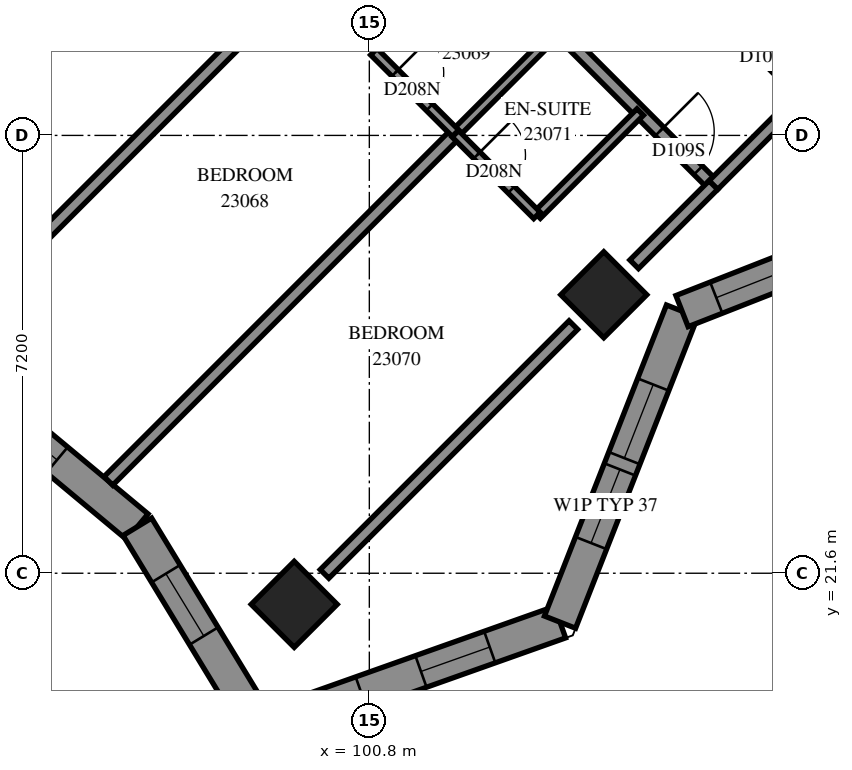
"""IFC4 building model, lengths in metres.
Left out: names, types, materials, properties, quantities, classifications, styles, units other than length and angle.
Written with IfcOpenShell. Run it as: python <this file> out.ifc"""

import sys

from ifc_helpers import new_model, si_unit, direction, frame, frame_2d, origin, origin_2d, place, context, subcontext, project, spatial, polyline, rectangle, outline, extrude, element, fill, save


model = new_model("IFC4")
c1 = context("Model", 3, precision=1e-05, world=origin(), true_north=direction((0.0, 1.0)))
c2 = subcontext(c1, "Body", "Model", "MODEL_VIEW")
j1 = project(units=[si_unit("LENGTHUNIT", "METRE"), si_unit("PLANEANGLEUNIT", "RADIAN")], contexts=[c1])
p1 = place(None, origin())
s1 = spatial("IfcSite", under=j1, at=p1, CompositionType="ELEMENT")
p2 = place(p1, origin())
s2 = spatial("IfcBuilding", under=s1, at=p2, CompositionType="ELEMENT")
p3 = place(p2, frame((0.0, 0.0, 88.0)))
s3 = spatial("IfcBuildingStorey", under=s2, at=p3, CompositionType="ELEMENT", Elevation=88.0)
for number, where, z_axis, x_axis in (
    (1, (104.656, 26.18, 0.0), (0.0, 0.0, 1.0), (0.707, -0.707, 0.0)),
    (2, (99.565, 21.088, 0.0), (0.0, 0.0, 1.0), (0.707, -0.707, 0.0)),
):
    element("IfcColumn", number, at=place(p3, frame(where, z_axis=z_axis, x_axis=x_axis)), inside=s3, PredefinedType="COLUMN", context=c2, shape_type="SweptSolid", body=[
        extrude(rectangle(XDim=1.0, YDim=1.0, at=origin_2d()), origin(), (0.0, 0.0, 1.0), 3.1),
    ])
p4 = place(p3, frame((99.004, 19.046, 0.0), z_axis=(0.0, 0.0, 1.0), x_axis=(0.9424217233, 0.3344268162, 0.0)))
e3 = element("IfcWall", 3, at=p4, inside=s3, PredefinedType="SOLIDWALL", context=c2, shape_type="SweptSolid", body=[
    extrude(outline(polyline([(-0.224, -0.275), (5.359, -0.275), (5.108, 0.275), (0.224, 0.275), (-0.224, -0.275)])), origin(), (0.0, 0.0, 1.0), 3.1),
])
p5 = place(p4, frame((0.565, 0.0, 0.5)))
e4 = element("IfcOpeningElement", 4, at=p5, cuts=e3, PredefinedType="OPENING", context=c2, shape_type="SweptSolid", body=[
    extrude(rectangle(XDim=1.2, YDim=2.45, at=frame_2d((0.6, 1.225))), frame((0.0, 0.285, 0.0), z_axis=(0.0, -1.0, 0.0), x_axis=(1.0, 0.0, 0.0)), (0.0, 0.0, 1.0), 0.57),
])
p6 = place(p4, frame((2.807, 0.0, 0.5)))
e5 = element("IfcOpeningElement", 5, at=p6, cuts=e3, PredefinedType="OPENING", context=c2, shape_type="SweptSolid", body=[
    extrude(rectangle(XDim=1.2, YDim=2.45, at=frame_2d((0.6, 1.225))), frame((0.0, 0.285, 0.0), z_axis=(0.0, -1.0, 0.0), x_axis=(1.0, 0.0, 0.0)), (0.0, 0.0, 1.0), 0.57),
])
p7 = place(p3, frame((103.936, 20.796, 0.0), z_axis=(0.0, 0.0, 1.0), x_axis=(0.3651939331, 0.9309314643, 0.0)))
e6 = element("IfcWall", 6, at=p7, inside=s3, PredefinedType="SOLIDWALL", context=c2, shape_type="SweptSolid", body=[
    extrude(outline(polyline([(-0.125, -0.275), (5.374, -0.275), (5.614, 0.275), (0.125, 0.275), (-0.125, -0.275)])), origin(), (0.0, 0.0, 1.0), 3.1),
])
p8 = place(p7, frame((1.397, 0.0, 0.5)))
e7 = element("IfcOpeningElement", 7, at=p8, cuts=e6, PredefinedType="OPENING", context=c2, shape_type="SweptSolid", body=[
    extrude(rectangle(XDim=1.3, YDim=2.45, at=frame_2d((0.65, 1.225))), frame((0.0, 0.285, 0.0), z_axis=(0.0, -1.0, 0.0), x_axis=(1.0, 0.0, 0.0)), (0.0, 0.0, 1.0), 0.57),
])
p9 = place(p7, frame((2.897, 0.0, 0.5)))
e8 = element("IfcOpeningElement", 8, at=p9, cuts=e6, PredefinedType="OPENING", context=c2, shape_type="SweptSolid", body=[
    extrude(rectangle(XDim=1.3, YDim=2.45, at=frame_2d((0.65, 1.225))), frame((0.0, 0.285, 0.0), z_axis=(0.0, -1.0, 0.0), x_axis=(1.0, 0.0, 0.0)), (0.0, 0.0, 1.0), 0.57),
])
p10 = place(p3, frame((105.942, 25.91, 0.0), z_axis=(0.0, 0.0, 1.0), x_axis=(0.9309314643, 0.3651939331, 0.0)))
e9 = element("IfcWall", 9, at=p10, inside=s3, PredefinedType="SOLIDWALL", context=c2, shape_type="SweptSolid", body=[
    extrude(outline(polyline([(0.12, -0.275), (5.62, -0.275), (5.369, 0.275), (-0.12, 0.275), (0.12, -0.275)])), origin(), (0.0, 0.0, 1.0), 3.1),
])
p11 = place(p10, frame((0.605, 0.0, 0.5)))
e10 = element("IfcOpeningElement", 10, at=p11, cuts=e9, PredefinedType="OPENING", context=c2, shape_type="SweptSolid", body=[
    extrude(rectangle(XDim=1.2, YDim=2.45, at=frame_2d((0.6, 1.225))), frame((0.0, 0.285, 0.0), z_axis=(0.0, -1.0, 0.0), x_axis=(1.0, 0.0, 0.0)), (0.0, 0.0, 1.0), 0.57),
])
p12 = place(p10, frame((3.089, 0.0, 0.5)))
e11 = element("IfcOpeningElement", 11, at=p12, cuts=e9, PredefinedType="OPENING", context=c2, shape_type="SweptSolid", body=[
    extrude(rectangle(XDim=1.2, YDim=2.45, at=frame_2d((0.6, 1.225))), frame((0.0, 0.285, 0.0), z_axis=(0.0, -1.0, 0.0), x_axis=(1.0, 0.0, 0.0)), (0.0, 0.0, 1.0), 0.57),
])
p13 = place(p3, frame((93.923, 24.913, 0.0), z_axis=(0.0, 0.0, 1.0), x_axis=(0.7685750371, -0.639759652, 0.0)))
e12 = element("IfcWall", 12, at=p13, inside=s3, PredefinedType="SOLIDWALL", context=c2, shape_type="SweptSolid", body=[
    extrude(outline(polyline([(-0.025, -0.275), (3.938, -0.275), (4.03, 0.275), (0.025, 0.275), (-0.025, -0.275)])), origin(), (0.0, 0.0, 1.0), 3.1),
])
p14 = place(p13, frame((1.066, 0.0, 0.5)))
e13 = element("IfcOpeningElement", 13, at=p14, cuts=e12, PredefinedType="OPENING", context=c2, shape_type="SweptSolid", body=[
    extrude(rectangle(XDim=1.2, YDim=2.45, at=frame_2d((0.6, 1.225))), frame((0.0, 0.285, 0.0), z_axis=(0.0, -1.0, 0.0), x_axis=(1.0, 0.0, 0.0)), (0.0, 0.0, 1.0), 0.57),
])
p15 = place(p3, frame((96.985, 22.364, 0.0), z_axis=(0.0, 0.0, 1.0), x_axis=(0.5197558303, -0.8543148581, 0.0)))
e14 = element("IfcWall", 14, at=p15, inside=s3, PredefinedType="SOLIDWALL", context=c2, shape_type="SweptSolid", body=[
    extrude(outline(polyline([(0.046, -0.275), (4.108, -0.275), (3.661, 0.275), (-0.046, 0.275), (0.046, -0.275)])), origin(), (0.0, 0.0, 1.0), 3.1),
])
p16 = place(p15, frame((0.903, 0.0, 0.5)))
e15 = element("IfcOpeningElement", 15, at=p16, cuts=e14, PredefinedType="OPENING", context=c2, shape_type="SweptSolid", body=[
    extrude(rectangle(XDim=1.2, YDim=2.45, at=frame_2d((0.6, 1.225))), frame((0.0, 0.285, 0.0), z_axis=(0.0, -1.0, 0.0), x_axis=(1.0, 0.0, 0.0)), (0.0, 0.0, 1.0), 0.57),
])
p17 = place(p3, frame((96.509, 23.118, 0.0), z_axis=(0.0, 0.0, 1.0), x_axis=(0.7069829425, 0.7072305982, 0.0)))
e16 = element("IfcWall", 16, at=p17, inside=s3, PredefinedType="PARTITIONING", context=c2, shape_type="SweptSolid", body=[
    extrude(rectangle(XDim=8.076, YDim=0.2, at=frame_2d((4.038, 0.0))), origin(), (0.0, 0.0, 1.0), 3.1),
])
p18 = place(p3, frame((101.365, 33.071, 0.0), z_axis=(0.0, 0.0, 1.0), x_axis=(0.7071067812, -0.7071067812, 0.0)))
e17 = element("IfcWall", 17, at=p18, inside=s3, PredefinedType="PARTITIONING", context=c2, shape_type="SweptSolid", body=[
    extrude(rectangle(XDim=7.2, YDim=0.2, at=frame_2d((3.6, 0.0))), origin(), (0.0, 0.0, 1.0), 3.1),
])
p19 = place(p18, frame((0.248, 0.0, 0.0)))
e18 = element("IfcOpeningElement", 18, at=p19, cuts=e17, PredefinedType="OPENING", context=c2, shape_type="SweptSolid", body=[
    extrude(rectangle(XDim=0.9, YDim=2.1, at=frame_2d((0.45, 1.05))), frame((0.0, 0.11, 0.0), z_axis=(0.0, -1.0, 0.0), x_axis=(1.0, 0.0, 0.0)), (0.0, 0.0, 1.0), 0.22),
])
p20 = place(p18, frame((5.95, 0.0, 0.0)))
e19 = element("IfcOpeningElement", 19, at=p20, cuts=e17, PredefinedType="OPENING", context=c2, shape_type="SweptSolid", body=[
    extrude(rectangle(XDim=0.9, YDim=2.1, at=frame_2d((0.45, 1.05))), frame((0.0, 0.11, 0.0), z_axis=(0.0, -1.0, 0.0), x_axis=(1.0, 0.0, 0.0)), (0.0, 0.0, 1.0), 0.22),
])
p21 = place(p3, frame((100.063, 21.589, 0.0), z_axis=(0.0, 0.0, 1.0), x_axis=(0.7071067812, 0.7071067812, 0.0)))
e20 = element("IfcWall", 20, at=p21, inside=s3, PredefinedType="PARTITIONING", context=c2, shape_type="SweptSolid", body=[
    extrude(rectangle(XDim=5.787, YDim=0.2, at=frame_2d((2.893, 0.0))), origin(), (0.0, 0.0, 1.0), 2.6),
])
p22 = place(p3, frame((94.973, 26.681, 0.0), z_axis=(0.0, 0.0, 1.0), x_axis=(0.7071067812, 0.7071067812, 0.0)))
e21 = element("IfcWall", 21, at=p22, inside=s3, PredefinedType="PARTITIONING", context=c2, shape_type="SweptSolid", body=[
    extrude(rectangle(XDim=5.784, YDim=0.2, at=frame_2d((2.892, 0.0))), origin(), (0.0, 0.0, 1.0), 3.1),
])
p23 = place(p3, frame((104.123, 33.282, 0.0), z_axis=(0.0, 0.0, 1.0), x_axis=(0.7071067812, -0.7071067812, 0.0)))
e22 = element("IfcWall", 22, at=p23, inside=s3, PredefinedType="PARTITIONING", context=c2, shape_type="SweptSolid", body=[
    extrude(rectangle(XDim=5.399, YDim=0.2, at=frame_2d((2.7, 0.0))), origin(), (0.0, 0.0, 1.0), 3.1),
])
p24 = place(p23, frame((4.08, 0.0, 0.0)))
e23 = element("IfcOpeningElement", 23, at=p24, cuts=e22, PredefinedType="OPENING", context=c2, shape_type="SweptSolid", body=[
    extrude(rectangle(XDim=0.9, YDim=2.1, at=frame_2d((0.45, 1.05))), frame((0.0, 0.11, 0.0), z_axis=(0.0, -1.0, 0.0), x_axis=(1.0, 0.0, 0.0)), (0.0, 0.0, 1.0), 0.22),
])
p25 = place(p3, frame((100.871, 30.175, 0.0), z_axis=(0.0, 0.0, 1.0), x_axis=(0.7071067812, 0.7071067812, 0.0)))
e24 = element("IfcWall", 24, at=p25, inside=s3, PredefinedType="PARTITIONING", context=c2, shape_type="SweptSolid", body=[
    extrude(rectangle(XDim=2.401, YDim=0.15, at=frame_2d((1.201, 0.0))), origin(), (0.0, 0.0, 1.0), 3.1),
])
for number, where, z_axis, x_axis in (
    (25, (102.216, 28.832, 0.0), (0.0, 0.0, 1.0), (0.707, 0.707, 0.0)),
    (26, (103.559, 27.489, 0.0), (0.0, 0.0, 1.0), (0.707, 0.707, 0.0)),
):
    element("IfcWall", number, at=place(p3, frame(where, z_axis=z_axis, x_axis=x_axis)), inside=s3, PredefinedType="PARTITIONING", context=c2, shape_type="SweptSolid", body=[
        extrude(rectangle(XDim=2.398, YDim=0.15, at=frame_2d((1.199, 0.0))), origin(), (0.0, 0.0, 1.0), 3.1),
    ])
p26 = place(p3, frame((106.457, 27.983, 0.0), z_axis=(0.0, 0.0, 1.0), x_axis=(0.7071067812, 0.7071067812, 0.0)))
e27 = element("IfcWall", 27, at=p26, inside=s3, PredefinedType="PARTITIONING", context=c2, shape_type="SweptSolid", body=[
    extrude(rectangle(XDim=2.102, YDim=0.2, at=frame_2d((1.051, 0.0))), origin(), (0.0, 0.0, 1.0), 2.6),
])
p27 = place(p3, frame((100.875, 30.177, 0.0), z_axis=(0.0, 0.0, 1.0), x_axis=(0.7076330979, -0.7065800724, 0.0)))
e28 = element("IfcWall", 28, at=p27, inside=s3, PredefinedType="PARTITIONING", context=c2, shape_type="SweptSolid", body=[
    extrude(rectangle(XDim=1.899, YDim=0.15, at=frame_2d((0.95, 0.0))), origin(), (0.0, 0.0, 1.0), 3.1),
])
p28 = place(p27, frame((0.493, 0.0, 0.0)))
e29 = element("IfcOpeningElement", 29, at=p28, cuts=e28, PredefinedType="OPENING", context=c2, shape_type="SweptSolid", body=[
    extrude(rectangle(XDim=0.8, YDim=2.1, at=frame_2d((0.4, 1.05))), frame((0.0, 0.085, 0.0), z_axis=(0.0, -1.0, 0.0), x_axis=(1.0, 0.0, 0.0)), (0.0, 0.0, 1.0), 0.17),
])
p29 = place(p3, frame((102.215, 28.826, 0.0), z_axis=(0.0, 0.0, 1.0), x_axis=(0.7071067812, -0.7071067812, 0.0)))
e30 = element("IfcWall", 30, at=p29, inside=s3, PredefinedType="PARTITIONING", context=c2, shape_type="SweptSolid", body=[
    extrude(rectangle(XDim=1.898, YDim=0.15, at=frame_2d((0.949, 0.0))), origin(), (0.0, 0.0, 1.0), 3.1),
])
p30 = place(p29, frame((0.5, 0.0, 0.0)))
e31 = element("IfcOpeningElement", 31, at=p30, cuts=e30, PredefinedType="OPENING", context=c2, shape_type="SweptSolid", body=[
    extrude(rectangle(XDim=0.8, YDim=2.1, at=frame_2d((0.4, 1.05))), frame((0.0, 0.085, 0.0), z_axis=(0.0, -1.0, 0.0), x_axis=(1.0, 0.0, 0.0)), (0.0, 0.0, 1.0), 0.17),
])
p31 = place(p3, frame((105.155, 26.681, 0.0), z_axis=(0.0, 0.0, 1.0), x_axis=(0.7071067812, 0.7071067812, 0.0)))
e32 = element("IfcWall", 32, at=p31, inside=s3, PredefinedType="PARTITIONING", context=c2, shape_type="SweptSolid", body=[
    extrude(rectangle(XDim=1.841, YDim=0.2, at=frame_2d((0.921, 0.0))), origin(), (0.0, 0.0, 1.0), 2.6),
])
p32 = place(p5, origin())
e33 = element("IfcWindow", 33, at=p32, inside=s3, PartitioningType="SINGLE_PANEL", PredefinedType="WINDOW", context=c2, shape_type="SweptSolid", body=[
    extrude(rectangle(XDim=1.2, YDim=2.45, at=frame_2d((0.6, 1.225))), frame((0.0, 0.155, 0.0), z_axis=(0.0, -1.0, 0.0), x_axis=(1.0, 0.0, 0.0)), (0.0, 0.0, 1.0), 0.06),
])
fill(e4, e33)
p33 = place(p6, origin())
e34 = element("IfcWindow", 34, at=p33, inside=s3, PartitioningType="SINGLE_PANEL", PredefinedType="WINDOW", context=c2, shape_type="SweptSolid", body=[
    extrude(rectangle(XDim=1.2, YDim=2.45, at=frame_2d((0.6, 1.225))), frame((0.0, 0.155, 0.0), z_axis=(0.0, -1.0, 0.0), x_axis=(1.0, 0.0, 0.0)), (0.0, 0.0, 1.0), 0.06),
])
fill(e5, e34)
p34 = place(p8, origin())
e35 = element("IfcWindow", 35, at=p34, inside=s3, PartitioningType="SINGLE_PANEL", PredefinedType="WINDOW", context=c2, shape_type="SweptSolid", body=[
    extrude(rectangle(XDim=1.3, YDim=2.45, at=frame_2d((0.65, 1.225))), frame((0.0, 0.155, 0.0), z_axis=(0.0, -1.0, 0.0), x_axis=(1.0, 0.0, 0.0)), (0.0, 0.0, 1.0), 0.06),
])
fill(e7, e35)
p35 = place(p9, origin())
e36 = element("IfcWindow", 36, at=p35, inside=s3, PartitioningType="SINGLE_PANEL", PredefinedType="WINDOW", context=c2, shape_type="SweptSolid", body=[
    extrude(rectangle(XDim=1.3, YDim=2.45, at=frame_2d((0.65, 1.225))), frame((0.0, 0.155, 0.0), z_axis=(0.0, -1.0, 0.0), x_axis=(1.0, 0.0, 0.0)), (0.0, 0.0, 1.0), 0.06),
])
fill(e8, e36)
p36 = place(p11, origin())
e37 = element("IfcWindow", 37, at=p36, inside=s3, PartitioningType="SINGLE_PANEL", PredefinedType="WINDOW", context=c2, shape_type="SweptSolid", body=[
    extrude(rectangle(XDim=1.2, YDim=2.45, at=frame_2d((0.6, 1.225))), frame((0.0, 0.155, 0.0), z_axis=(0.0, -1.0, 0.0), x_axis=(1.0, 0.0, 0.0)), (0.0, 0.0, 1.0), 0.06),
])
fill(e10, e37)
p37 = place(p14, origin())
e38 = element("IfcWindow", 38, at=p37, inside=s3, PartitioningType="SINGLE_PANEL", PredefinedType="WINDOW", context=c2, shape_type="SweptSolid", body=[
    extrude(rectangle(XDim=1.2, YDim=2.45, at=frame_2d((0.6, 1.225))), frame((0.0, 0.155, 0.0), z_axis=(0.0, -1.0, 0.0), x_axis=(1.0, 0.0, 0.0)), (0.0, 0.0, 1.0), 0.06),
])
fill(e13, e38)
p38 = place(p16, origin())
e39 = element("IfcWindow", 39, at=p38, inside=s3, PartitioningType="SINGLE_PANEL", PredefinedType="WINDOW", context=c2, shape_type="SweptSolid", body=[
    extrude(rectangle(XDim=1.2, YDim=2.45, at=frame_2d((0.6, 1.225))), frame((0.0, 0.155, 0.0), z_axis=(0.0, -1.0, 0.0), x_axis=(1.0, 0.0, 0.0)), (0.0, 0.0, 1.0), 0.06),
])
fill(e15, e39)
p39 = place(p28, origin())
e40 = element("IfcDoor", 40, at=p39, inside=s3, OperationType="SINGLE_SWING_RIGHT", PredefinedType="DOOR", context=c2, shape_type="SweptSolid", body=[
    extrude(rectangle(XDim=0.8, YDim=2.1, at=frame_2d((0.4, 1.05))), frame((0.0, 0.025, 0.0), z_axis=(0.0, -1.0, 0.0), x_axis=(1.0, 0.0, 0.0)), (0.0, 0.0, 1.0), 0.05),
])
fill(e29, e40)
p40 = place(p20, origin())
e41 = element("IfcDoor", 41, at=p40, inside=s3, OperationType="SINGLE_SWING_LEFT", PredefinedType="DOOR", context=c2, shape_type="SweptSolid", body=[
    extrude(rectangle(XDim=0.9, YDim=2.1, at=frame_2d((0.45, 1.05))), frame((0.0, 0.025, 0.0), z_axis=(0.0, -1.0, 0.0), x_axis=(1.0, 0.0, 0.0)), (0.0, 0.0, 1.0), 0.05),
])
fill(e19, e41)
p41 = place(p30, origin())
e42 = element("IfcDoor", 42, at=p41, inside=s3, OperationType="SINGLE_SWING_RIGHT", PredefinedType="DOOR", context=c2, shape_type="SweptSolid", body=[
    extrude(rectangle(XDim=0.8, YDim=2.1, at=frame_2d((0.4, 1.05))), frame((0.0, 0.025, 0.0), z_axis=(0.0, -1.0, 0.0), x_axis=(1.0, 0.0, 0.0)), (0.0, 0.0, 1.0), 0.05),
])
fill(e31, e42)
p42 = place(p24, origin())
e43 = element("IfcDoor", 43, at=p42, inside=s3, OperationType="SINGLE_SWING_RIGHT", PredefinedType="DOOR", context=c2, shape_type="SweptSolid", body=[
    extrude(rectangle(XDim=0.9, YDim=2.1, at=frame_2d((0.45, 1.05))), frame((0.0, 0.025, 0.0), z_axis=(0.0, -1.0, 0.0), x_axis=(1.0, 0.0, 0.0)), (0.0, 0.0, 1.0), 0.05),
])
fill(e23, e43)
save(model, sys.argv[1])
